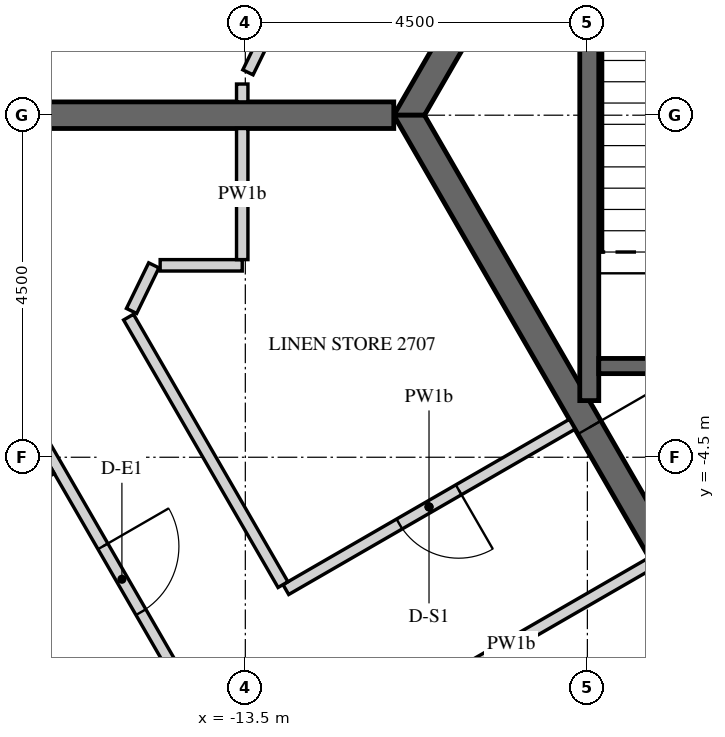
"""IFC4 building model, lengths in metres.
Left out: names, types, materials, properties, quantities, classifications, styles, units other than length and angle.
Written with IfcOpenShell. Run it as: python <this file> out.ifc"""

import sys

from ifc_helpers import new_model, si_unit, direction, frame, frame_2d, origin, place, context, subcontext, project, spatial, polyline, rectangle, outline, extrude, element, fill, save


model = new_model("IFC4")
c1 = context("Model", 3, precision=1e-05, world=origin(), true_north=direction((0.0, 1.0)))
c2 = subcontext(c1, "Body", "Model", "MODEL_VIEW")
j1 = project(units=[si_unit("LENGTHUNIT", "METRE"), si_unit("PLANEANGLEUNIT", "RADIAN")], contexts=[c1])
p1 = place(None, origin())
s1 = spatial("IfcSite", under=j1, at=p1, CompositionType="ELEMENT")
p2 = place(p1, origin())
s2 = spatial("IfcBuilding", under=s1, at=p2, CompositionType="ELEMENT")
p3 = place(p2, frame((0.0, 0.0, 349.5)))
s3 = spatial("IfcBuildingStorey", under=s2, at=p3, CompositionType="ELEMENT", Elevation=349.5)
p4 = place(p3, frame((-14.619, 19.699, 0.0), z_axis=(0.0, 0.0, 1.0), x_axis=(-0.438373747484, -0.898792777851, 0.0)))
e1 = element("IfcWall", 1, at=p4, inside=s3, PredefinedType="SOLIDWALL", context=c2, shape_type="SweptSolid", body=[
    extrude(outline(polyline([(0.225, -0.225), (20.506, -0.225), (20.957, 0.225), (-0.225, 0.225), (0.225, -0.225)])), origin(), (0.0, 0.0, 1.0), 3.75),
])
p5 = place(p4, frame((0.325, 0.0, 0.9)))
e2 = element("IfcOpeningElement", 2, at=p5, cuts=e1, PredefinedType="OPENING", context=c2, shape_type="SweptSolid", body=[
    extrude(rectangle(XDim=0.9, YDim=1.5, at=frame_2d((0.45, 0.75))), frame((0.0, 0.235, 0.0), z_axis=(0.0, -1.0, 0.0), x_axis=(1.0, 0.0, 0.0)), (0.0, 0.0, 1.0), 0.47),
])
p6 = place(p4, frame((1.525, 0.0, 0.0)))
e3 = element("IfcOpeningElement", 3, at=p6, cuts=e1, PredefinedType="OPENING", context=c2, shape_type="SweptSolid", body=[
    extrude(rectangle(XDim=1.2, YDim=2.4, at=frame_2d((0.6, 1.2))), frame((0.0, 0.235, 0.0), z_axis=(0.0, -1.0, 0.0), x_axis=(1.0, 0.0, 0.0)), (0.0, 0.0, 1.0), 0.47),
])
p7 = place(p4, frame((3.766, 0.0, 0.9)))
e4 = element("IfcOpeningElement", 4, at=p7, cuts=e1, PredefinedType="OPENING", context=c2, shape_type="SweptSolid", body=[
    extrude(rectangle(XDim=0.9, YDim=1.5, at=frame_2d((0.45, 0.75))), frame((0.0, 0.235, 0.0), z_axis=(0.0, -1.0, 0.0), x_axis=(1.0, 0.0, 0.0)), (0.0, 0.0, 1.0), 0.47),
])
p8 = place(p4, frame((4.966, 0.0, 0.0)))
e5 = element("IfcOpeningElement", 5, at=p8, cuts=e1, PredefinedType="OPENING", context=c2, shape_type="SweptSolid", body=[
    extrude(rectangle(XDim=1.2, YDim=2.4, at=frame_2d((0.6, 1.2))), frame((0.0, 0.235, 0.0), z_axis=(0.0, -1.0, 0.0), x_axis=(1.0, 0.0, 0.0)), (0.0, 0.0, 1.0), 0.47),
])
p9 = place(p4, frame((7.366, 0.0, 0.9)))
e6 = element("IfcOpeningElement", 6, at=p9, cuts=e1, PredefinedType="OPENING", context=c2, shape_type="SweptSolid", body=[
    extrude(rectangle(XDim=0.9, YDim=1.5, at=frame_2d((0.45, 0.75))), frame((0.0, 0.235, 0.0), z_axis=(0.0, -1.0, 0.0), x_axis=(1.0, 0.0, 0.0)), (0.0, 0.0, 1.0), 0.47),
])
p10 = place(p4, frame((8.566, 0.0, 0.0)))
e7 = element("IfcOpeningElement", 7, at=p10, cuts=e1, PredefinedType="OPENING", context=c2, shape_type="SweptSolid", body=[
    extrude(rectangle(XDim=1.2, YDim=2.4, at=frame_2d((0.6, 1.2))), frame((0.0, 0.235, 0.0), z_axis=(0.0, -1.0, 0.0), x_axis=(1.0, 0.0, 0.0)), (0.0, 0.0, 1.0), 0.47),
])
p11 = place(p4, frame((10.966, 0.0, 0.9)))
e8 = element("IfcOpeningElement", 8, at=p11, cuts=e1, PredefinedType="OPENING", context=c2, shape_type="SweptSolid", body=[
    extrude(rectangle(XDim=0.9, YDim=1.5, at=frame_2d((0.45, 0.75))), frame((0.0, 0.235, 0.0), z_axis=(0.0, -1.0, 0.0), x_axis=(1.0, 0.0, 0.0)), (0.0, 0.0, 1.0), 0.47),
])
p12 = place(p4, frame((12.166, 0.0, 0.0)))
e9 = element("IfcOpeningElement", 9, at=p12, cuts=e1, PredefinedType="OPENING", context=c2, shape_type="SweptSolid", body=[
    extrude(rectangle(XDim=1.2, YDim=2.4, at=frame_2d((0.6, 1.2))), frame((0.0, 0.235, 0.0), z_axis=(0.0, -1.0, 0.0), x_axis=(1.0, 0.0, 0.0)), (0.0, 0.0, 1.0), 0.47),
])
p13 = place(p4, frame((14.566, 0.0, 0.9)))
e10 = element("IfcOpeningElement", 10, at=p13, cuts=e1, PredefinedType="OPENING", context=c2, shape_type="SweptSolid", body=[
    extrude(rectangle(XDim=0.9, YDim=1.5, at=frame_2d((0.45, 0.75))), frame((0.0, 0.235, 0.0), z_axis=(0.0, -1.0, 0.0), x_axis=(1.0, 0.0, 0.0)), (0.0, 0.0, 1.0), 0.47),
])
p14 = place(p4, frame((15.766, 0.0, 0.0)))
e11 = element("IfcOpeningElement", 11, at=p14, cuts=e1, PredefinedType="OPENING", context=c2, shape_type="SweptSolid", body=[
    extrude(rectangle(XDim=1.2, YDim=2.4, at=frame_2d((0.6, 1.2))), frame((0.0, 0.235, 0.0), z_axis=(0.0, -1.0, 0.0), x_axis=(1.0, 0.0, 0.0)), (0.0, 0.0, 1.0), 0.47),
])
p15 = place(p4, frame((18.007, 0.0, 0.9)))
e12 = element("IfcOpeningElement", 12, at=p15, cuts=e1, PredefinedType="OPENING", context=c2, shape_type="SweptSolid", body=[
    extrude(rectangle(XDim=0.9, YDim=1.5, at=frame_2d((0.45, 0.75))), frame((0.0, 0.235, 0.0), z_axis=(0.0, -1.0, 0.0), x_axis=(1.0, 0.0, 0.0)), (0.0, 0.0, 1.0), 0.47),
])
p16 = place(p4, frame((19.207, 0.0, 0.0)))
e13 = element("IfcOpeningElement", 13, at=p16, cuts=e1, PredefinedType="OPENING", context=c2, shape_type="SweptSolid", body=[
    extrude(rectangle(XDim=1.2, YDim=2.4, at=frame_2d((0.6, 1.2))), frame((0.0, 0.235, 0.0), z_axis=(0.0, -1.0, 0.0), x_axis=(1.0, 0.0, 0.0)), (0.0, 0.0, 1.0), 0.47),
])
p17 = place(p3, frame((-25.907, -2.678, 0.0), z_axis=(0.0, 0.0, 1.0), x_axis=(0.499997453958, -0.866026873738, 0.0)))
e14 = element("IfcWall", 14, at=p17, inside=s3, PredefinedType="SOLIDWALL", context=c2, shape_type="SweptSolid", body=[
    extrude(outline(polyline([(-0.018, -0.225), (23.152, -0.225), (23.11, 0.225), (0.018, 0.225), (-0.018, -0.225)])), origin(), (0.0, 0.0, 1.0), 3.75),
])
p18 = place(p17, frame((1.366, 0.0, 0.3)))
e15 = element("IfcOpeningElement", 15, at=p18, cuts=e14, PredefinedType="OPENING", context=c2, shape_type="SweptSolid", body=[
    extrude(rectangle(XDim=2.4, YDim=3.0, at=frame_2d((1.2, 1.5))), frame((0.0, 0.235, 0.0), z_axis=(0.0, -1.0, 0.0), x_axis=(1.0, 0.0, 0.0)), (0.0, 0.0, 1.0), 0.47),
])
p19 = place(p17, frame((4.966, 0.0, 0.3)))
e16 = element("IfcOpeningElement", 16, at=p19, cuts=e14, PredefinedType="OPENING", context=c2, shape_type="SweptSolid", body=[
    extrude(rectangle(XDim=2.4, YDim=3.0, at=frame_2d((1.2, 1.5))), frame((0.0, 0.235, 0.0), z_axis=(0.0, -1.0, 0.0), x_axis=(1.0, 0.0, 0.0)), (0.0, 0.0, 1.0), 0.47),
])
p20 = place(p17, frame((8.566, 0.0, 0.3)))
e17 = element("IfcOpeningElement", 17, at=p20, cuts=e14, PredefinedType="OPENING", context=c2, shape_type="SweptSolid", body=[
    extrude(rectangle(XDim=2.4, YDim=3.0, at=frame_2d((1.2, 1.5))), frame((0.0, 0.235, 0.0), z_axis=(0.0, -1.0, 0.0), x_axis=(1.0, 0.0, 0.0)), (0.0, 0.0, 1.0), 0.47),
])
p21 = place(p17, frame((12.166, 0.0, 0.3)))
e18 = element("IfcOpeningElement", 18, at=p21, cuts=e14, PredefinedType="OPENING", context=c2, shape_type="SweptSolid", body=[
    extrude(rectangle(XDim=2.4, YDim=3.0, at=frame_2d((1.2, 1.5))), frame((0.0, 0.235, 0.0), z_axis=(0.0, -1.0, 0.0), x_axis=(1.0, 0.0, 0.0)), (0.0, 0.0, 1.0), 0.47),
])
p22 = place(p17, frame((15.766, 0.0, 0.3)))
e19 = element("IfcOpeningElement", 19, at=p22, cuts=e14, PredefinedType="OPENING", context=c2, shape_type="SweptSolid", body=[
    extrude(rectangle(XDim=2.4, YDim=3.0, at=frame_2d((1.2, 1.5))), frame((0.0, 0.235, 0.0), z_axis=(0.0, -1.0, 0.0), x_axis=(1.0, 0.0, 0.0)), (0.0, 0.0, 1.0), 0.47),
])
p23 = place(p17, frame((19.366, 0.0, 0.3)))
e20 = element("IfcOpeningElement", 20, at=p23, cuts=e14, PredefinedType="OPENING", context=c2, shape_type="SweptSolid", body=[
    extrude(rectangle(XDim=2.4, YDim=3.0, at=frame_2d((1.2, 1.5))), frame((0.0, 0.235, 0.0), z_axis=(0.0, -1.0, 0.0), x_axis=(1.0, 0.0, 0.0)), (0.0, 0.0, 1.0), 0.47),
])
p24 = place(p3, frame((-5.673, 9.825, 0.0), z_axis=(0.0, 0.0, 1.0), x_axis=(-0.499995046907, -0.866028263435, 0.0)))
e21 = element("IfcWall", 21, at=p24, inside=s3, PredefinedType="SHEAR", context=c2, shape_type="SweptSolid", body=[
    extrude(outline(polyline([(-0.101, -0.175), (11.446, -0.175), (11.244, 0.175), (0.101, 0.175), (-0.101, -0.175)])), origin(), (0.0, 0.0, 1.0), 3.75),
])
p25 = place(p24, frame((4.801, 0.0, 0.0)))
e22 = element("IfcOpeningElement", 22, at=p25, cuts=e21, PredefinedType="OPENING", context=c2, shape_type="SweptSolid", body=[
    extrude(rectangle(XDim=1.8, YDim=2.4, at=frame_2d((0.9, 1.2))), frame((0.0, 0.185, 0.0), z_axis=(0.0, -1.0, 0.0), x_axis=(1.0, 0.0, 0.0)), (0.0, 0.0, 1.0), 0.37),
])
p26 = place(p3, frame((-11.345, 0.0, 0.0), z_axis=(0.0, 0.0, 1.0), x_axis=(0.499995046907, -0.866028263435, 0.0)))
e23 = element("IfcWall", 23, at=p26, inside=s3, PredefinedType="SHEAR", context=c2, shape_type="SweptSolid", body=[
    extrude(outline(polyline([(-0.101, -0.175), (11.446, -0.175), (11.244, 0.175), (0.101, 0.175), (-0.101, -0.175)])), origin(), (0.0, 0.0, 1.0), 3.75),
])
p27 = place(p26, frame((4.744, 0.0, 0.0)))
e24 = element("IfcOpeningElement", 24, at=p27, cuts=e23, PredefinedType="OPENING", context=c2, shape_type="SweptSolid", body=[
    extrude(rectangle(XDim=1.8, YDim=2.4, at=frame_2d((0.9, 1.2))), frame((0.0, 0.185, 0.0), z_axis=(0.0, -1.0, 0.0), x_axis=(1.0, 0.0, 0.0)), (0.0, 0.0, 1.0), 0.37),
])
p28 = place(p3, frame((-11.547, 0.0, 0.0), z_axis=(0.0, 0.0, 1.0), x_axis=(-1.0, 0.0, 0.0)))
e25 = element("IfcWall", 25, at=p28, inside=s3, PredefinedType="SHEAR", context=c2, shape_type="SweptSolid", body=[
    extrude(rectangle(XDim=14.51, YDim=0.35, at=frame_2d((7.255, 0.0))), origin(), (0.0, 0.0, 1.0), 3.75),
])
p29 = place(p28, frame((6.355, 0.0, 0.0)))
e26 = element("IfcOpeningElement", 26, at=p29, cuts=e25, PredefinedType="OPENING", context=c2, shape_type="SweptSolid", body=[
    extrude(rectangle(XDim=1.8, YDim=2.4, at=frame_2d((0.9, 1.2))), frame((0.0, 0.185, 0.0), z_axis=(0.0, -1.0, 0.0), x_axis=(1.0, 0.0, 0.0)), (0.0, 0.0, 1.0), 0.37),
])
p30 = place(p3, frame((-8.975, -3.755, -0.5), z_axis=(0.0, 0.0, 1.0), x_axis=(0.0, 1.0, 0.0)))
e27 = element("IfcWall", 27, at=p30, inside=s3, PredefinedType="SHEAR", context=c2, shape_type="SweptSolid", body=[
    extrude(rectangle(XDim=7.51, YDim=0.25, at=frame_2d((3.755, 0.0))), origin(), (0.0, 0.0, 1.0), 4.15),
])
p31 = place(p3, frame((-8.85, -3.3, -0.5), z_axis=(0.0, 0.0, 1.0), x_axis=(1.0, 0.0, 0.0)))
e28 = element("IfcWall", 28, at=p31, inside=s3, PredefinedType="SHEAR", context=c2, shape_type="SweptSolid", body=[
    extrude(rectangle(XDim=2.95, YDim=0.2, at=frame_2d((1.475, 0.0))), origin(), (0.0, 0.0, 1.0), 4.15),
])
p32 = place(p31, frame((0.875, 0.0, 0.5)))
e29 = element("IfcOpeningElement", 29, at=p32, cuts=e28, PredefinedType="OPENING", context=c2, shape_type="SweptSolid", body=[
    extrude(rectangle(XDim=1.2, YDim=2.4, at=frame_2d((0.6, 1.2))), frame((0.0, 0.11, 0.0), z_axis=(0.0, -1.0, 0.0), x_axis=(1.0, 0.0, 0.0)), (0.0, 0.0, 1.0), 0.22),
])
p33 = place(p3, frame((-13.541, 0.175, 0.0), z_axis=(0.0, 0.0, 1.0), x_axis=(0.0, 1.0, 0.0)))
e30 = element("IfcWall", 30, at=p33, inside=s3, PredefinedType="PARTITIONING", context=c2, shape_type="SweptSolid", body=[
    extrude(rectangle(XDim=0.235, YDim=0.15, at=frame_2d((0.118, 0.0))), origin(), (0.0, 0.0, 1.0), 2.82),
])
p34 = place(p3, frame((-13.466, 0.564, 0.0), z_axis=(0.0, 0.0, 1.0), x_axis=(0.438366040624, 0.898796536724, 0.0)))
e31 = element("IfcWall", 31, at=p34, inside=s3, PredefinedType="PARTITIONING", context=c2, shape_type="SweptSolid", body=[
    extrude(rectangle(XDim=5.178, YDim=0.15, at=frame_2d((2.589, 0.0))), origin(), (0.0, 0.0, 1.0), 2.82),
])
p35 = place(p3, frame((-17.036, -2.792, 0.0), z_axis=(0.0, 0.0, 1.0), x_axis=(0.500006428338, -0.86602169235, 0.0)))
e32 = element("IfcWall", 32, at=p35, inside=s3, PredefinedType="PARTITIONING", context=c2, shape_type="SweptSolid", body=[
    extrude(rectangle(XDim=13.966, YDim=0.15, at=frame_2d((6.983, 0.0))), origin(), (0.0, 0.0, 1.0), 2.82),
])
p36 = place(p35, frame((3.325, 0.0, 0.0)))
e33 = element("IfcOpeningElement", 33, at=p36, cuts=e32, PredefinedType="OPENING", context=c2, shape_type="SweptSolid", body=[
    extrude(rectangle(XDim=1.0, YDim=2.1, at=frame_2d((0.5, 1.05))), frame((0.0, 0.085, 0.0), z_axis=(0.0, -1.0, 0.0), x_axis=(1.0, 0.0, 0.0)), (0.0, 0.0, 1.0), 0.17),
])
p37 = place(p3, frame((-9.2, -4.066, 0.0), z_axis=(0.0, 0.0, 1.0), x_axis=(-0.866013608182, -0.500020430026, 0.0)))
e34 = element("IfcWall", 34, at=p37, inside=s3, PredefinedType="PARTITIONING", context=c2, shape_type="SweptSolid", body=[
    extrude(rectangle(XDim=4.35, YDim=0.15, at=frame_2d((2.175, 0.0))), origin(), (0.0, 0.0, 1.0), 2.82),
])
p38 = place(p37, frame((1.725, 0.0, 0.0)))
e35 = element("IfcOpeningElement", 35, at=p38, cuts=e34, PredefinedType="OPENING", context=c2, shape_type="SweptSolid", body=[
    extrude(rectangle(XDim=0.9, YDim=2.1, at=frame_2d((0.45, 1.05))), frame((0.0, 0.085, 0.0), z_axis=(0.0, -1.0, 0.0), x_axis=(1.0, 0.0, 0.0)), (0.0, 0.0, 1.0), 0.17),
])
p39 = place(p3, frame((-13.004, -6.176, 0.0), z_axis=(0.0, 0.0, 1.0), x_axis=(-0.500022342669, 0.866012503854, 0.0)))
e36 = element("IfcWall", 36, at=p39, inside=s3, PredefinedType="PARTITIONING", context=c2, shape_type="SweptSolid", body=[
    extrude(rectangle(XDim=4.064, YDim=0.15, at=frame_2d((2.032, 0.0))), origin(), (0.0, 0.0, 1.0), 2.82),
])
p40 = place(p3, frame((-14.997, -2.575, 0.0), z_axis=(0.0, 0.0, 1.0), x_axis=(0.438416427913, 0.898771959808, 0.0)))
e37 = element("IfcWall", 37, at=p40, inside=s3, PredefinedType="PARTITIONING", context=c2, shape_type="SweptSolid", body=[
    extrude(rectangle(XDim=0.668, YDim=0.15, at=frame_2d((0.334, 0.0))), origin(), (0.0, 0.0, 1.0), 2.82),
])
p41 = place(p3, frame((-14.62, -1.975, 0.0), z_axis=(0.0, 0.0, 1.0), x_axis=(1.0, 0.0, 0.0)))
e38 = element("IfcWall", 38, at=p41, inside=s3, PredefinedType="PARTITIONING", context=c2, shape_type="SweptSolid", body=[
    extrude(rectangle(XDim=1.08, YDim=0.15, at=frame_2d((0.54, 0.0))), origin(), (0.0, 0.0, 1.0), 2.82),
])
p42 = place(p3, frame((-13.541, -1.9, 0.0), z_axis=(0.0, 0.0, 1.0), x_axis=(0.0, 1.0, 0.0)))
e39 = element("IfcWall", 39, at=p42, inside=s3, PredefinedType="PARTITIONING", context=c2, shape_type="SweptSolid", body=[
    extrude(rectangle(XDim=1.725, YDim=0.15, at=frame_2d((0.862, 0.0))), origin(), (0.0, 0.0, 1.0), 2.82),
])
p43 = place(p3, frame((-11.852, -8.022, 0.0), z_axis=(0.0, 0.0, 1.0), x_axis=(0.866038183914, 0.499977863513, 0.0)))
e40 = element("IfcWall", 40, at=p43, inside=s3, PredefinedType="PARTITIONING", context=c2, shape_type="SweptSolid", body=[
    extrude(rectangle(XDim=4.275, YDim=0.15, at=frame_2d((2.138, 0.0))), origin(), (0.0, 0.0, 1.0), 2.82),
])
p44 = place(p3, frame((-16.039, -4.67, 0.0), z_axis=(0.0, 0.0, 1.0), x_axis=(-0.866031034943, -0.499990246421, 0.0)))
e41 = element("IfcWall", 41, at=p44, inside=s3, PredefinedType="PARTITIONING", context=c2, shape_type="SweptSolid", body=[
    extrude(rectangle(XDim=3.525, YDim=0.1, at=frame_2d((1.762, 0.0))), origin(), (0.0, 0.0, 1.0), 2.82),
])
p45 = place(p44, frame((1.325, 0.0, 0.0)))
e42 = element("IfcOpeningElement", 42, at=p45, cuts=e41, PredefinedType="OPENING", context=c2, shape_type="SweptSolid", body=[
    extrude(rectangle(XDim=0.8, YDim=2.1, at=frame_2d((0.4, 1.05))), frame((0.0, 0.06, 0.0), z_axis=(0.0, -1.0, 0.0), x_axis=(1.0, 0.0, 0.0)), (0.0, 0.0, 1.0), 0.12),
])
p46 = place(p27, origin())
e43 = element("IfcDoor", 43, at=p46, inside=s3, OperationType="DOUBLE_DOOR_SINGLE_SWING", PredefinedType="DOOR", context=c2, shape_type="SweptSolid", body=[
    extrude(rectangle(XDim=1.8, YDim=2.4, at=frame_2d((0.9, 1.2))), frame((0.0, 0.025, 0.0), z_axis=(0.0, -1.0, 0.0), x_axis=(1.0, 0.0, 0.0)), (0.0, 0.0, 1.0), 0.05),
])
fill(e24, e43)
p47 = place(p36, origin())
e44 = element("IfcDoor", 44, at=p47, inside=s3, OperationType="SINGLE_SWING_RIGHT", PredefinedType="DOOR", context=c2, shape_type="SweptSolid", body=[
    extrude(rectangle(XDim=1.0, YDim=2.1, at=frame_2d((0.5, 1.05))), frame((0.0, 0.025, 0.0), z_axis=(0.0, -1.0, 0.0), x_axis=(1.0, 0.0, 0.0)), (0.0, 0.0, 1.0), 0.05),
])
fill(e33, e44)
p48 = place(p38, origin())
e45 = element("IfcDoor", 45, at=p48, inside=s3, OperationType="SINGLE_SWING_LEFT", PredefinedType="DOOR", context=c2, shape_type="SweptSolid", body=[
    extrude(rectangle(XDim=0.9, YDim=2.1, at=frame_2d((0.45, 1.05))), frame((0.0, 0.025, 0.0), z_axis=(0.0, -1.0, 0.0), x_axis=(1.0, 0.0, 0.0)), (0.0, 0.0, 1.0), 0.05),
])
fill(e35, e45)
save(model, sys.argv[1])
